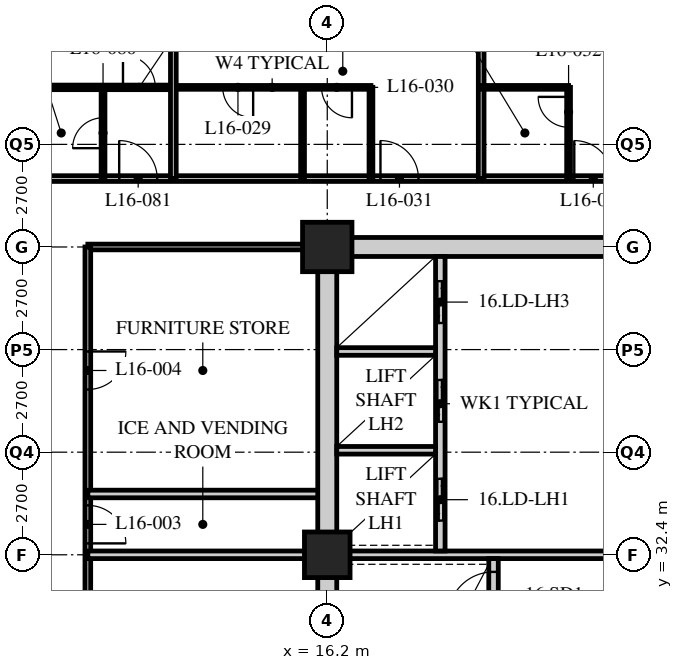
"""IFC4 building model, lengths in metres.
Left out: names, types, materials, properties, quantities, classifications, styles, units other than length and angle.
Written with IfcOpenShell. Run it as: python <this file> out.ifc"""

import sys

from ifc_helpers import new_model, si_unit, direction, frame, frame_2d, origin, origin_2d, place, context, subcontext, project, spatial, rectangle, hollow_rectangle, extrude, element, fill, save


model = new_model("IFC4")
c1 = context("Model", 3, precision=1e-05, world=origin(), true_north=direction((0.0, 1.0)))
c2 = subcontext(c1, "Body", "Model", "MODEL_VIEW")
j1 = project(units=[si_unit("LENGTHUNIT", "METRE"), si_unit("PLANEANGLEUNIT", "RADIAN")], contexts=[c1])
p1 = place(None, origin())
s1 = spatial("IfcSite", under=j1, at=p1, CompositionType="ELEMENT")
p2 = place(p1, origin())
s2 = spatial("IfcBuilding", under=s1, at=p2, CompositionType="ELEMENT")
p3 = place(p2, frame((0.0, 0.0, 67.0)))
s3 = spatial("IfcBuildingStorey", under=s2, at=p3, CompositionType="ELEMENT", Elevation=67.0)
p4 = place(p3, frame((16.2, 32.4, 0.0), z_axis=(0.0, 0.0, 1.0), x_axis=(1.0, 0.0, 0.0)))
e1 = element("IfcColumn", 1, at=p4, inside=s3, PredefinedType="COLUMN", context=c2, shape_type="SweptSolid", body=[
    extrude(hollow_rectangle(XDim=1.2, YDim=1.2, WallThickness=0.12, at=origin_2d()), origin(), (0.0, 0.0, 1.0), 3.4),
])
p5 = place(p3, frame((16.2, 40.5, 0.0), z_axis=(0.0, 0.0, 1.0), x_axis=(1.0, 0.0, 0.0)))
e2 = element("IfcColumn", 2, at=p5, inside=s3, PredefinedType="COLUMN", context=c2, shape_type="SweptSolid", body=[
    extrude(hollow_rectangle(XDim=1.3, YDim=1.3, WallThickness=0.13, at=origin_2d()), origin(), (0.0, 0.0, 1.0), 3.4),
])
p6 = place(p3, frame((8.1, 42.3, 0.0), z_axis=(0.0, 0.0, 1.0), x_axis=(1.0, 0.0, 0.0)))
e3 = element("IfcWall", 3, at=p6, inside=s3, PredefinedType="PARTITIONING", context=c2, shape_type="SweptSolid", body=[
    extrude(rectangle(XDim=36.45, YDim=0.15, at=frame_2d((18.225, 0.0))), origin(), (0.0, 0.0, 1.0), 3.19),
])
p7 = place(p6, frame((9.5, 0.0, 0.0)))
e4 = element("IfcOpeningElement", 4, at=p7, cuts=e3, PredefinedType="OPENING", context=c2, shape_type="SweptSolid", body=[
    extrude(rectangle(XDim=1.0, YDim=2.1, at=frame_2d((0.5, 1.05))), frame((0.0, 0.085, 0.0), z_axis=(0.0, -1.0, 0.0), x_axis=(1.0, 0.0, 0.0)), (0.0, 0.0, 1.0), 0.17),
])
p8 = place(p6, frame((14.6, 0.0, 0.0)))
e5 = element("IfcOpeningElement", 5, at=p8, cuts=e3, PredefinedType="OPENING", context=c2, shape_type="SweptSolid", body=[
    extrude(rectangle(XDim=1.0, YDim=2.1, at=frame_2d((0.5, 1.05))), frame((0.0, 0.085, 0.0), z_axis=(0.0, -1.0, 0.0), x_axis=(1.0, 0.0, 0.0)), (0.0, 0.0, 1.0), 0.17),
])
p9 = place(p6, frame((18.65, 0.0, 0.0)))
e6 = element("IfcOpeningElement", 6, at=p9, cuts=e3, PredefinedType="OPENING", context=c2, shape_type="SweptSolid", body=[
    extrude(rectangle(XDim=1.0, YDim=2.1, at=frame_2d((0.5, 1.05))), frame((0.0, 0.085, 0.0), z_axis=(0.0, -1.0, 0.0), x_axis=(1.0, 0.0, 0.0)), (0.0, 0.0, 1.0), 0.17),
])
p10 = place(p6, frame((25.7, 0.0, 0.0)))
e7 = element("IfcOpeningElement", 7, at=p10, cuts=e3, PredefinedType="OPENING", context=c2, shape_type="SweptSolid", body=[
    extrude(rectangle(XDim=1.0, YDim=2.1, at=frame_2d((0.5, 1.05))), frame((0.0, 0.085, 0.0), z_axis=(0.0, -1.0, 0.0), x_axis=(1.0, 0.0, 0.0)), (0.0, 0.0, 1.0), 0.17),
])
p11 = place(p6, frame((30.8, 0.0, 0.0)))
e8 = element("IfcOpeningElement", 8, at=p11, cuts=e3, PredefinedType="OPENING", context=c2, shape_type="SweptSolid", body=[
    extrude(rectangle(XDim=1.0, YDim=2.1, at=frame_2d((0.5, 1.05))), frame((0.0, 0.085, 0.0), z_axis=(0.0, -1.0, 0.0), x_axis=(1.0, 0.0, 0.0)), (0.0, 0.0, 1.0), 0.17),
])
p12 = place(p6, frame((32.825, 0.0, 0.0)))
e9 = element("IfcOpeningElement", 9, at=p12, cuts=e3, PredefinedType="OPENING", context=c2, shape_type="SweptSolid", body=[
    extrude(rectangle(XDim=1.0, YDim=2.1, at=frame_2d((0.5, 1.05))), frame((0.0, 0.085, 0.0), z_axis=(0.0, -1.0, 0.0), x_axis=(1.0, 0.0, 0.0)), (0.0, 0.0, 1.0), 0.17),
])
p13 = place(p6, frame((2.625, 0.0, 0.0)))
e10 = element("IfcOpeningElement", 10, at=p13, cuts=e3, PredefinedType="OPENING", context=c2, shape_type="SweptSolid", body=[
    extrude(rectangle(XDim=1.0, YDim=2.1, at=frame_2d((0.5, 1.05))), frame((0.0, 0.085, 0.0), z_axis=(0.0, -1.0, 0.0), x_axis=(1.0, 0.0, 0.0)), (0.0, 0.0, 1.0), 0.17),
])
p14 = place(p3, frame((16.0, 40.5, 0.0), z_axis=(0.0, 0.0, 1.0), x_axis=(-1.0, 0.0, 0.0)))
e11 = element("IfcWall", 11, at=p14, inside=s3, PredefinedType="PARTITIONING", context=c2, shape_type="SweptSolid", body=[
    extrude(rectangle(XDim=6.1, YDim=0.15, at=frame_2d((3.05, 0.0))), origin(), (0.0, 0.0, 1.0), 2.578),
])
p15 = place(p3, frame((9.9, 40.5, 0.0), z_axis=(0.0, 0.0, 1.0), x_axis=(0.0, -1.0, 0.0)))
e12 = element("IfcWall", 12, at=p15, inside=s3, PredefinedType="PARTITIONING", context=c2, shape_type="SweptSolid", body=[
    extrude(rectangle(XDim=26.55, YDim=0.15, at=frame_2d((13.275, 0.0))), origin(), (0.0, 0.0, 1.0), 3.19),
])
p16 = place(p15, frame((14.271, 0.0, 0.0)))
e13 = element("IfcOpeningElement", 13, at=p16, cuts=e12, PredefinedType="OPENING", context=c2, shape_type="SweptSolid", body=[
    extrude(rectangle(XDim=1.0, YDim=2.1, at=frame_2d((0.5, 1.05))), frame((0.0, 0.085, 0.0), z_axis=(0.0, -1.0, 0.0), x_axis=(1.0, 0.0, 0.0)), (0.0, 0.0, 1.0), 0.17),
])
p17 = place(p15, frame((10.221, 0.0, 0.0)))
e14 = element("IfcOpeningElement", 14, at=p17, cuts=e12, PredefinedType="OPENING", context=c2, shape_type="SweptSolid", body=[
    extrude(rectangle(XDim=1.0, YDim=2.1, at=frame_2d((0.5, 1.05))), frame((0.0, 0.085, 0.0), z_axis=(0.0, -1.0, 0.0), x_axis=(1.0, 0.0, 0.0)), (0.0, 0.0, 1.0), 0.17),
])
p18 = place(p15, frame((6.8, 0.0, 0.0)))
e15 = element("IfcOpeningElement", 15, at=p18, cuts=e12, PredefinedType="OPENING", context=c2, shape_type="SweptSolid", body=[
    extrude(rectangle(XDim=1.0, YDim=2.1, at=frame_2d((0.5, 1.05))), frame((0.0, 0.085, 0.0), z_axis=(0.0, -1.0, 0.0), x_axis=(1.0, 0.0, 0.0)), (0.0, 0.0, 1.0), 0.17),
])
p19 = place(p15, frame((2.75, 0.0, 0.0)))
e16 = element("IfcOpeningElement", 16, at=p19, cuts=e12, PredefinedType="OPENING", context=c2, shape_type="SweptSolid", body=[
    extrude(rectangle(XDim=1.0, YDim=2.1, at=frame_2d((0.5, 1.05))), frame((0.0, 0.085, 0.0), z_axis=(0.0, -1.0, 0.0), x_axis=(1.0, 0.0, 0.0)), (0.0, 0.0, 1.0), 0.17),
])
p20 = place(p3, frame((9.9, 32.4, 0.0), z_axis=(0.0, 0.0, 1.0), x_axis=(1.0, 0.0, 0.0)))
e17 = element("IfcWall", 17, at=p20, inside=s3, PredefinedType="SOLIDWALL", context=c2, shape_type="SweptSolid", body=[
    extrude(rectangle(XDim=6.3, YDim=0.2, at=frame_2d((3.15, 0.0))), origin(), (0.0, 0.0, 1.0), 2.578),
])
p21 = place(p3, frame((9.9, 34.0, 0.0), z_axis=(0.0, 0.0, 1.0), x_axis=(1.0, 0.0, 0.0)))
e18 = element("IfcWall", 18, at=p21, inside=s3, PredefinedType="SOLIDWALL", context=c2, shape_type="SweptSolid", body=[
    extrude(rectangle(XDim=6.3, YDim=0.2, at=frame_2d((3.15, 0.0))), origin(), (0.0, 0.0, 1.0), 3.19),
])
p22 = place(p3, frame((12.15, 44.7, 0.0), z_axis=(0.0, 0.0, 1.0), x_axis=(1.0, 0.0, 0.0)))
e19 = element("IfcWall", 19, at=p22, inside=s3, PredefinedType="PARTITIONING", context=c2, shape_type="SweptSolid", body=[
    extrude(rectangle(XDim=5.2, YDim=0.1, at=frame_2d((2.6, 0.0))), origin(), (0.0, 0.0, 1.0), 3.19),
])
p23 = place(p22, frame((1.3, 0.0, 0.0)))
e20 = element("IfcOpeningElement", 20, at=p23, cuts=e19, PredefinedType="OPENING", context=c2, shape_type="SweptSolid", body=[
    extrude(rectangle(XDim=0.8, YDim=2.1, at=frame_2d((0.4, 1.05))), frame((0.0, 0.06, 0.0), z_axis=(0.0, -1.0, 0.0), x_axis=(1.0, 0.0, 0.0)), (0.0, 0.0, 1.0), 0.12),
])
p24 = place(p22, frame((3.9, 0.0, 0.0)))
e21 = element("IfcOpeningElement", 21, at=p24, cuts=e19, PredefinedType="OPENING", context=c2, shape_type="SweptSolid", body=[
    extrude(rectangle(XDim=0.8, YDim=2.1, at=frame_2d((0.4, 1.05))), frame((0.0, 0.06, 0.0), z_axis=(0.0, -1.0, 0.0), x_axis=(1.0, 0.0, 0.0)), (0.0, 0.0, 1.0), 0.12),
])
for number, where, z_axis, x_axis in (
    (22, (15.55, 42.3, 0.0), (0.0, 0.0, 1.0), (0.0, 1.0, 0.0)),
    (23, (17.35, 42.3, 0.0), (0.0, 0.0, 1.0), (0.0, 1.0, 0.0)),
):
    element("IfcWall", number, at=place(p3, frame(where, z_axis=z_axis, x_axis=x_axis)), inside=s3, PredefinedType="PARTITIONING", context=c2, shape_type="SweptSolid", body=[
        extrude(rectangle(XDim=2.4, YDim=0.1, at=frame_2d((1.2, 0.0))), origin(), (0.0, 0.0, 1.0), 3.19),
    ])
p25 = place(p3, frame((20.25, 42.3, 0.0), z_axis=(0.0, 0.0, 1.0), x_axis=(0.0, 1.0, 0.0)))
e24 = element("IfcWall", 24, at=p25, inside=s3, PredefinedType="PARTITIONING", context=c2, shape_type="SweptSolid", body=[
    extrude(rectangle(XDim=6.0, YDim=0.15, at=frame_2d((3.0, 0.0))), origin(), (0.0, 0.0, 1.0), 3.19),
])
p26 = place(p3, frame((20.25, 44.7, 0.0), z_axis=(0.0, 0.0, 1.0), x_axis=(1.0, 0.0, 0.0)))
e25 = element("IfcWall", 25, at=p26, inside=s3, PredefinedType="PARTITIONING", context=c2, shape_type="SweptSolid", body=[
    extrude(rectangle(XDim=2.3, YDim=0.1, at=frame_2d((1.15, 0.0))), origin(), (0.0, 0.0, 1.0), 3.19),
])
p27 = place(p3, frame((22.55, 42.3, 0.0), z_axis=(0.0, 0.0, 1.0), x_axis=(0.0, 1.0, 0.0)))
e26 = element("IfcWall", 26, at=p27, inside=s3, PredefinedType="PARTITIONING", context=c2, shape_type="SweptSolid", body=[
    extrude(rectangle(XDim=2.4, YDim=0.1, at=frame_2d((1.2, 0.0))), origin(), (0.0, 0.0, 1.0), 3.19),
])
p28 = place(p27, frame((1.35, 0.0, 0.0)))
e27 = element("IfcOpeningElement", 27, at=p28, cuts=e26, PredefinedType="OPENING", context=c2, shape_type="SweptSolid", body=[
    extrude(rectangle(XDim=0.8, YDim=2.1, at=frame_2d((0.4, 1.05))), frame((0.0, 0.06, 0.0), z_axis=(0.0, -1.0, 0.0), x_axis=(1.0, 0.0, 0.0)), (0.0, 0.0, 1.0), 0.12),
])
p29 = place(p3, frame((8.1, 44.7, 0.0), z_axis=(0.0, 0.0, 1.0), x_axis=(1.0, 0.0, 0.0)))
e28 = element("IfcWall", 28, at=p29, inside=s3, PredefinedType="PARTITIONING", context=c2, shape_type="SweptSolid", body=[
    extrude(rectangle(XDim=4.05, YDim=0.12, at=frame_2d((2.025, 0.0))), origin(), (0.0, 0.0, 1.0), 3.19),
])
p30 = place(p29, frame((2.725, 0.0, 0.0)))
e29 = element("IfcOpeningElement", 29, at=p30, cuts=e28, PredefinedType="OPENING", context=c2, shape_type="SweptSolid", body=[
    extrude(rectangle(XDim=0.85, YDim=2.1, at=frame_2d((0.425, 1.05))), frame((0.0, 0.07, 0.0), z_axis=(0.0, -1.0, 0.0), x_axis=(1.0, 0.0, 0.0)), (0.0, 0.0, 1.0), 0.14),
])
p31 = place(p3, frame((10.3, 42.3, 0.0), z_axis=(0.0, 0.0, 1.0), x_axis=(0.0, 1.0, 0.0)))
e30 = element("IfcWall", 30, at=p31, inside=s3, PredefinedType="PARTITIONING", context=c2, shape_type="SweptSolid", body=[
    extrude(rectangle(XDim=2.4, YDim=0.1, at=frame_2d((1.2, 0.0))), origin(), (0.0, 0.0, 1.0), 3.19),
])
p32 = place(p31, frame((0.8, 0.0, 0.0)))
e31 = element("IfcOpeningElement", 31, at=p32, cuts=e30, PredefinedType="OPENING", context=c2, shape_type="SweptSolid", body=[
    extrude(rectangle(XDim=0.8, YDim=2.1, at=frame_2d((0.4, 1.05))), frame((0.0, 0.06, 0.0), z_axis=(0.0, -1.0, 0.0), x_axis=(1.0, 0.0, 0.0)), (0.0, 0.0, 1.0), 0.12),
])
p33 = place(p3, frame((12.15, 42.3, 0.0), z_axis=(0.0, 0.0, 1.0), x_axis=(0.0, 1.0, 0.0)))
e32 = element("IfcWall", 32, at=p33, inside=s3, PredefinedType="PARTITIONING", context=c2, shape_type="SweptSolid", body=[
    extrude(rectangle(XDim=6.0, YDim=0.15, at=frame_2d((3.0, 0.0))), origin(), (0.0, 0.0, 1.0), 3.19),
])
p34 = place(p3, frame((15.95, 40.5, 0.0), z_axis=(0.0, 0.0, 1.0), x_axis=(1.0, 0.0, 0.0)))
e33 = element("IfcWall", 33, at=p34, inside=s3, PredefinedType="SOLIDWALL", context=c2, shape_type="SweptSolid", body=[
    extrude(rectangle(XDim=24.8, YDim=0.5, at=frame_2d((12.4, 0.0))), origin(), (0.0, 0.0, 1.0), 2.54),
])
p35 = place(p34, frame((11.5, 0.0, 0.0)))
e34 = element("IfcOpeningElement", 34, at=p35, cuts=e33, PredefinedType="OPENING", context=c2, shape_type="SweptSolid", body=[
    extrude(rectangle(XDim=1.8, YDim=2.4, at=frame_2d((0.9, 1.2))), frame((0.0, 0.26, 0.0), z_axis=(0.0, -1.0, 0.0), x_axis=(1.0, 0.0, 0.0)), (0.0, 0.0, 1.0), 0.52),
])
p36 = place(p3, frame((16.2, 24.55, 0.0), z_axis=(0.0, 0.0, 1.0), x_axis=(0.0, 1.0, 0.0)))
e35 = element("IfcWall", 35, at=p36, inside=s3, PredefinedType="SOLIDWALL", context=c2, shape_type="SweptSolid", body=[
    extrude(rectangle(XDim=15.7, YDim=0.5, at=frame_2d((7.85, 0.0))), origin(), (0.0, 0.0, 1.0), 2.578),
])
p37 = place(p3, frame((16.45, 32.4, 0.0), z_axis=(0.0, 0.0, 1.0), x_axis=(1.0, 0.0, 0.0)))
e36 = element("IfcWall", 36, at=p37, inside=s3, PredefinedType="SOLIDWALL", context=c2, shape_type="SweptSolid", body=[
    extrude(rectangle(XDim=7.95, YDim=0.2, at=frame_2d((3.975, 0.0))), origin(), (0.0, 0.0, 1.0), 2.578),
])
p38 = place(p3, frame((20.575, 24.55, 0.0), z_axis=(0.0, 0.0, 1.0), x_axis=(0.0, 1.0, 0.0)))
e37 = element("IfcWall", 37, at=p38, inside=s3, PredefinedType="SOLIDWALL", context=c2, shape_type="SweptSolid", body=[
    extrude(rectangle(XDim=7.75, YDim=0.25, at=frame_2d((3.875, 0.0))), origin(), (0.0, 0.0, 1.0), 3.19),
])
p39 = place(p38, frame((6.2, 0.0, 0.0)))
e38 = element("IfcOpeningElement", 38, at=p39, cuts=e37, PredefinedType="OPENING", context=c2, shape_type="SweptSolid", body=[
    extrude(rectangle(XDim=1.2, YDim=2.1, at=frame_2d((0.6, 1.05))), frame((0.0, 0.135, 0.0), z_axis=(0.0, -1.0, 0.0), x_axis=(1.0, 0.0, 0.0)), (0.0, 0.0, 1.0), 0.27),
])
p40 = place(p3, frame((19.175, 32.5, 0.0), z_axis=(0.0, 0.0, 1.0), x_axis=(0.0, 1.0, 0.0)))
e39 = element("IfcWall", 39, at=p40, inside=s3, PredefinedType="SOLIDWALL", context=c2, shape_type="SweptSolid", body=[
    extrude(rectangle(XDim=7.75, YDim=0.25, at=frame_2d((3.875, 0.0))), origin(), (0.0, 0.0, 1.0), 3.19),
])
p41 = place(p40, frame((0.8, 0.0, 0.0)))
e40 = element("IfcOpeningElement", 40, at=p41, cuts=e39, PredefinedType="OPENING", context=c2, shape_type="SweptSolid", body=[
    extrude(rectangle(XDim=1.1, YDim=2.4, at=frame_2d((0.55, 1.2))), frame((0.0, 0.135, 0.0), z_axis=(0.0, -1.0, 0.0), x_axis=(1.0, 0.0, 0.0)), (0.0, 0.0, 1.0), 0.27),
])
p42 = place(p40, frame((3.4, 0.0, 0.0)))
e41 = element("IfcOpeningElement", 41, at=p42, cuts=e39, PredefinedType="OPENING", context=c2, shape_type="SweptSolid", body=[
    extrude(rectangle(XDim=1.1, YDim=2.4, at=frame_2d((0.55, 1.2))), frame((0.0, 0.135, 0.0), z_axis=(0.0, -1.0, 0.0), x_axis=(1.0, 0.0, 0.0)), (0.0, 0.0, 1.0), 0.27),
])
p43 = place(p40, frame((6.0, 0.0, 0.0)))
e42 = element("IfcOpeningElement", 42, at=p43, cuts=e39, PredefinedType="OPENING", context=c2, shape_type="SweptSolid", body=[
    extrude(rectangle(XDim=1.1, YDim=2.4, at=frame_2d((0.55, 1.2))), frame((0.0, 0.135, 0.0), z_axis=(0.0, -1.0, 0.0), x_axis=(1.0, 0.0, 0.0)), (0.0, 0.0, 1.0), 0.27),
])
for number, where, z_axis, x_axis in (
    (43, (16.45, 35.15, 0.0), (0.0, 0.0, 1.0), (1.0, 0.0, 0.0)),
    (44, (16.45, 37.75, 0.0), (0.0, 0.0, 1.0), (1.0, 0.0, 0.0)),
):
    element("IfcWall", number, at=place(p3, frame(where, z_axis=z_axis, x_axis=x_axis)), inside=s3, PredefinedType="SOLIDWALL", context=c2, shape_type="SweptSolid", body=[
        extrude(rectangle(XDim=2.6, YDim=0.2, at=frame_2d((1.3, 0.0))), origin(), (0.0, 0.0, 1.0), 3.19),
    ])
p44 = place(p18, origin())
e45 = element("IfcDoor", 45, at=p44, inside=s3, OperationType="SINGLE_SWING_RIGHT", PredefinedType="DOOR", context=c2, shape_type="SweptSolid", body=[
    extrude(rectangle(XDim=1.0, YDim=2.1, at=frame_2d((0.5, 1.05))), frame((0.0, 0.025, 0.0), z_axis=(0.0, -1.0, 0.0), x_axis=(1.0, 0.0, 0.0)), (0.0, 0.0, 1.0), 0.05),
])
fill(e15, e45)
p45 = place(p19, origin())
e46 = element("IfcDoor", 46, at=p45, inside=s3, OperationType="SINGLE_SWING_LEFT", PredefinedType="DOOR", context=c2, shape_type="SweptSolid", body=[
    extrude(rectangle(XDim=1.0, YDim=2.1, at=frame_2d((0.5, 1.05))), frame((0.0, 0.025, 0.0), z_axis=(0.0, -1.0, 0.0), x_axis=(1.0, 0.0, 0.0)), (0.0, 0.0, 1.0), 0.05),
])
fill(e16, e46)
p46 = place(p23, origin())
e47 = element("IfcDoor", 47, at=p46, inside=s3, OperationType="SINGLE_SWING_LEFT", PredefinedType="DOOR", context=c2, shape_type="SweptSolid", body=[
    extrude(rectangle(XDim=0.8, YDim=2.1, at=frame_2d((0.4, 1.05))), frame((0.0, 0.025, 0.0), z_axis=(0.0, -1.0, 0.0), x_axis=(1.0, 0.0, 0.0)), (0.0, 0.0, 1.0), 0.05),
])
fill(e20, e47)
p47 = place(p24, origin())
e48 = element("IfcDoor", 48, at=p47, inside=s3, OperationType="SINGLE_SWING_LEFT", PredefinedType="DOOR", context=c2, shape_type="SweptSolid", body=[
    extrude(rectangle(XDim=0.8, YDim=2.1, at=frame_2d((0.4, 1.05))), frame((0.0, 0.025, 0.0), z_axis=(0.0, -1.0, 0.0), x_axis=(1.0, 0.0, 0.0)), (0.0, 0.0, 1.0), 0.05),
])
fill(e21, e48)
p48 = place(p7, origin())
e49 = element("IfcDoor", 49, at=p48, inside=s3, OperationType="SINGLE_SWING_LEFT", PredefinedType="DOOR", context=c2, shape_type="SweptSolid", body=[
    extrude(rectangle(XDim=1.0, YDim=2.1, at=frame_2d((0.5, 1.05))), frame((0.0, 0.025, 0.0), z_axis=(0.0, -1.0, 0.0), x_axis=(1.0, 0.0, 0.0)), (0.0, 0.0, 1.0), 0.05),
])
fill(e4, e49)
p49 = place(p28, origin())
e50 = element("IfcDoor", 50, at=p49, inside=s3, OperationType="SINGLE_SWING_RIGHT", PredefinedType="DOOR", context=c2, shape_type="SweptSolid", body=[
    extrude(rectangle(XDim=0.8, YDim=2.1, at=frame_2d((0.4, 1.05))), frame((0.0, 0.025, 0.0), z_axis=(0.0, -1.0, 0.0), x_axis=(1.0, 0.0, 0.0)), (0.0, 0.0, 1.0), 0.05),
])
fill(e27, e50)
p50 = place(p8, origin())
e51 = element("IfcDoor", 51, at=p50, inside=s3, OperationType="SINGLE_SWING_LEFT", PredefinedType="DOOR", context=c2, shape_type="SweptSolid", body=[
    extrude(rectangle(XDim=1.0, YDim=2.1, at=frame_2d((0.5, 1.05))), frame((0.0, 0.025, 0.0), z_axis=(0.0, -1.0, 0.0), x_axis=(1.0, 0.0, 0.0)), (0.0, 0.0, 1.0), 0.05),
])
fill(e5, e51)
p51 = place(p32, origin())
e52 = element("IfcDoor", 52, at=p51, inside=s3, OperationType="SINGLE_SWING_LEFT", PredefinedType="DOOR", context=c2, shape_type="SweptSolid", body=[
    extrude(rectangle(XDim=0.8, YDim=2.1, at=frame_2d((0.4, 1.05))), frame((0.0, 0.025, 0.0), z_axis=(0.0, -1.0, 0.0), x_axis=(1.0, 0.0, 0.0)), (0.0, 0.0, 1.0), 0.05),
])
fill(e31, e52)
p52 = place(p13, origin())
e53 = element("IfcDoor", 53, at=p52, inside=s3, OperationType="SINGLE_SWING_LEFT", PredefinedType="DOOR", context=c2, shape_type="SweptSolid", body=[
    extrude(rectangle(XDim=1.0, YDim=2.1, at=frame_2d((0.5, 1.05))), frame((0.0, 0.025, 0.0), z_axis=(0.0, -1.0, 0.0), x_axis=(1.0, 0.0, 0.0)), (0.0, 0.0, 1.0), 0.05),
])
fill(e10, e53)
p53 = place(p30, origin())
e54 = element("IfcDoor", 54, at=p53, inside=s3, OperationType="SINGLE_SWING_LEFT", PredefinedType="DOOR", context=c2, shape_type="SweptSolid", body=[
    extrude(rectangle(XDim=0.85, YDim=2.1, at=frame_2d((0.425, 1.05))), frame((0.0, 0.025, 0.0), z_axis=(0.0, -1.0, 0.0), x_axis=(1.0, 0.0, 0.0)), (0.0, 0.0, 1.0), 0.05),
])
fill(e29, e54)
p54 = place(p39, origin())
e55 = element("IfcDoor", 55, at=p54, inside=s3, OperationType="SINGLE_SWING_LEFT", PredefinedType="DOOR", context=c2, shape_type="SweptSolid", body=[
    extrude(rectangle(XDim=1.2, YDim=2.1, at=frame_2d((0.6, 1.05))), frame((0.0, 0.025, 0.0), z_axis=(0.0, -1.0, 0.0), x_axis=(1.0, 0.0, 0.0)), (0.0, 0.0, 1.0), 0.05),
])
fill(e38, e55)
p55 = place(p41, origin())
e56 = element("IfcDoor", 56, at=p55, inside=s3, OperationType="DOUBLE_DOOR_SLIDING", PredefinedType="DOOR", context=c2, shape_type="SweptSolid", body=[
    extrude(rectangle(XDim=1.1, YDim=2.4, at=frame_2d((0.55, 1.2))), frame((0.0, 0.025, 0.0), z_axis=(0.0, -1.0, 0.0), x_axis=(1.0, 0.0, 0.0)), (0.0, 0.0, 1.0), 0.05),
])
fill(e40, e56)
p56 = place(p42, origin())
e57 = element("IfcDoor", 57, at=p56, inside=s3, OperationType="DOUBLE_DOOR_SLIDING", PredefinedType="DOOR", context=c2, shape_type="SweptSolid", body=[
    extrude(rectangle(XDim=1.1, YDim=2.4, at=frame_2d((0.55, 1.2))), frame((0.0, 0.025, 0.0), z_axis=(0.0, -1.0, 0.0), x_axis=(1.0, 0.0, 0.0)), (0.0, 0.0, 1.0), 0.05),
])
fill(e41, e57)
p57 = place(p43, origin())
e58 = element("IfcDoor", 58, at=p57, inside=s3, OperationType="DOUBLE_DOOR_SLIDING", PredefinedType="DOOR", context=c2, shape_type="SweptSolid", body=[
    extrude(rectangle(XDim=1.1, YDim=2.4, at=frame_2d((0.55, 1.2))), frame((0.0, 0.025, 0.0), z_axis=(0.0, -1.0, 0.0), x_axis=(1.0, 0.0, 0.0)), (0.0, 0.0, 1.0), 0.05),
])
fill(e42, e58)
save(model, sys.argv[1])
